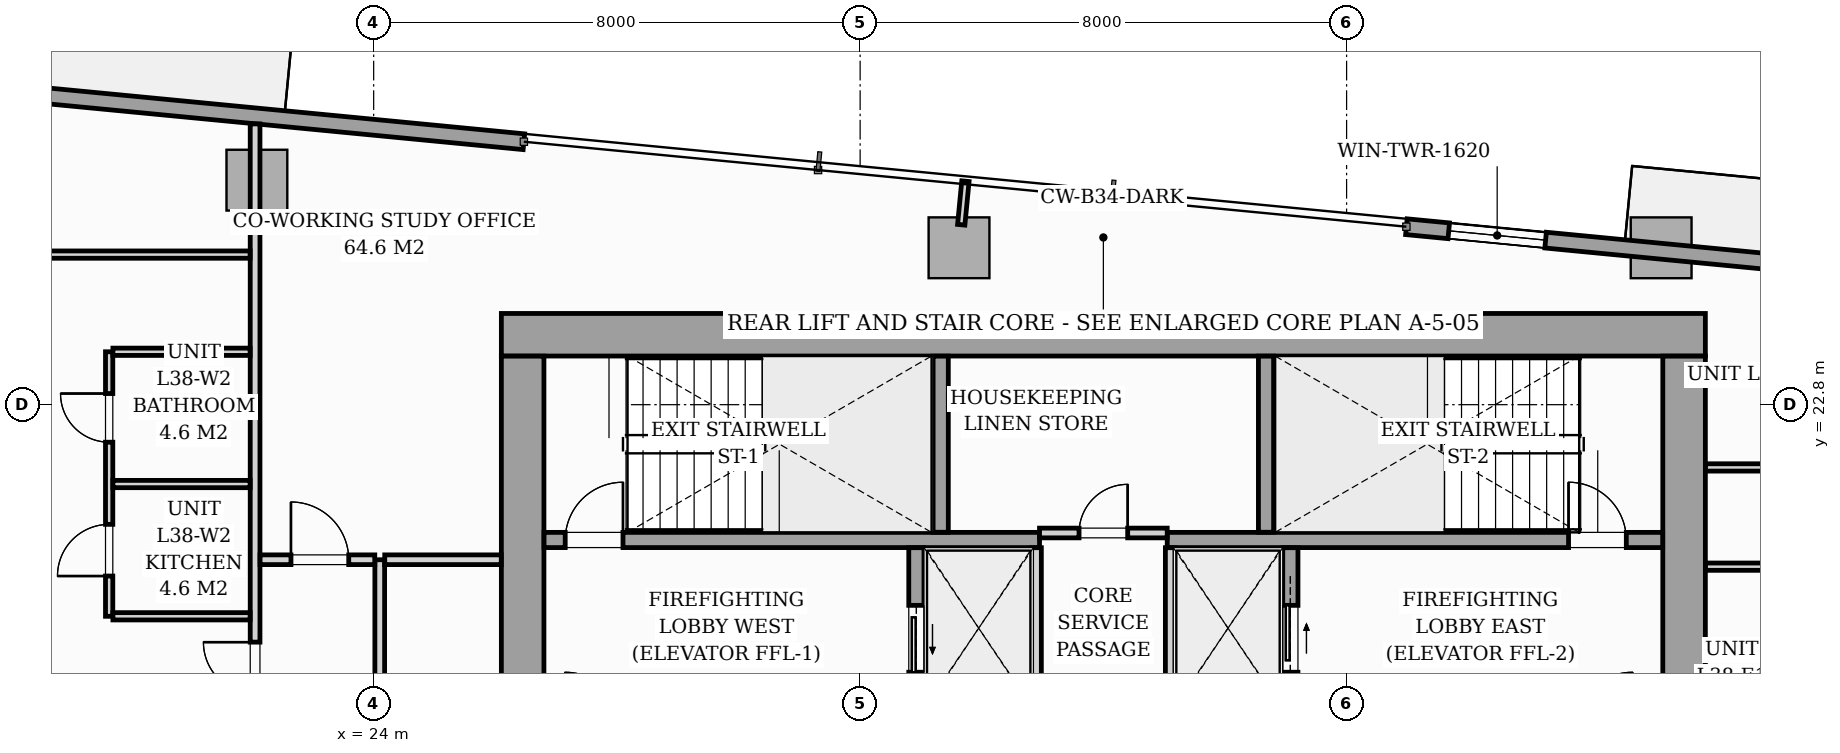
"""IFC4 building model, lengths in metres.
Left out: names, types, materials, properties, quantities, classifications, styles, units other than length and angle.
Written with IfcOpenShell. Run it as: python <this file> out.ifc"""

import sys

from ifc_helpers import new_model, si_unit, direction, frame, frame_2d, origin, origin_2d, place, context, subcontext, project, spatial, rectangle, i_section, extrude, source, transform, mapped, element, fill, save


model = new_model("IFC4")
c1 = context("Model", 3, precision=1e-05, world=origin(), true_north=direction((0.0, 1.0)))
c2 = subcontext(c1, "Body", "Model", "MODEL_VIEW")
j1 = project(units=[si_unit("LENGTHUNIT", "METRE"), si_unit("PLANEANGLEUNIT", "RADIAN")], contexts=[c1])
p1 = place(None, origin())
s1 = spatial("IfcSite", under=j1, at=p1, CompositionType="ELEMENT")
p2 = place(p1, origin())
s2 = spatial("IfcBuilding", under=s1, at=p2, CompositionType="ELEMENT")
p3 = place(p2, frame((0.0, 0.0, 134.2)))
s3 = spatial("IfcBuildingStorey", under=s2, at=p3, CompositionType="ELEMENT", Elevation=134.2)
m1 = source(origin(), c2, "Body", "SweptSolid", [
    extrude(i_section(OverallWidth=0.421, OverallDepth=0.465, WebThickness=0.045, FlangeThickness=0.073, FilletRadius=0.018, at=origin_2d()), origin(), (0.0, 0.0, 1.0), 3.196),
])
for number, where, z_axis, x_axis in (
    (1, (26.4, 24.0, 0.002), (0.0, 0.0, 1.0), (1.0, 0.0, 0.0)),
    (2, (33.12, 24.0, 0.002), (0.0, 0.0, 1.0), (1.0, 0.0, 0.0)),
    (3, (38.88, 24.0, 0.002), (0.0, 0.0, 1.0), (1.0, 0.0, 0.0)),
    (4, (45.6, 24.0, 0.002), (0.0, 0.0, 1.0), (1.0, 0.0, 0.0)),
):
    element("IfcColumn", number, at=place(p3, frame(where, z_axis=z_axis, x_axis=x_axis)), inside=s3, PredefinedType="PILASTER", context=c2, shape_type="MappedRepresentation", body=[
        mapped(m1, transform((0.0, 0.0, 0.0), scale=1.0)),
    ])
m2 = source(origin(), c2, "Body", "SweptSolid", [
    extrude(rectangle(XDim=1.0, YDim=1.0, at=origin_2d()), origin(), (0.0, 0.0, 1.0), 3.196),
])
for number, where, z_axis, x_axis in (
    (5, (22.08, 26.492, 0.002), (0.0, 0.0, 1.0), (0.995, -0.096, 0.0)),
    (6, (33.626, 25.38, 0.002), (0.0, 0.0, 1.0), (0.995, -0.096, 0.0)),
    (7, (45.173, 25.38, 0.002), (0.0, 0.0, 1.0), (0.995, -0.096, 0.0)),
):
    element("IfcColumn", number, at=place(p3, frame(where, z_axis=z_axis, x_axis=x_axis)), inside=s3, PredefinedType="COLUMN", context=c2, shape_type="MappedRepresentation", body=[
        mapped(m2, transform((0.0, 0.0, 0.0), scale=1.0)),
    ])
p4 = place(p3, frame((9.539, 28.754, 0.0), z_axis=(0.0, 0.0, 1.0), x_axis=(0.995397345886, -0.09583383433, 0.0)))
e8 = element("IfcWall", 8, at=p4, inside=s3, PredefinedType="STANDARD", context=c2, shape_type="SweptSolid", body=[
    extrude(rectangle(XDim=17.01, YDim=0.26, at=frame_2d((8.505, 0.0))), origin(), (0.0, 0.0, 1.0), 2.94),
])
p5 = place(p4, frame((6.424, 0.0, 0.0)))
e9 = element("IfcOpeningElement", 9, at=p5, cuts=e8, PredefinedType="OPENING", context=c2, shape_type="SweptSolid", body=[
    extrude(rectangle(XDim=1.8, YDim=2.06, at=frame_2d((0.9, 1.03))), frame((0.0, 0.14, 0.0), z_axis=(0.0, -1.0, 0.0), x_axis=(1.0, 0.0, 0.0)), (0.0, 0.0, 1.0), 0.28),
])
p6 = place(p4, frame((2.05, 0.0, 0.65)))
e10 = element("IfcOpeningElement", 10, at=p6, cuts=e8, PredefinedType="OPENING", context=c2, shape_type="SweptSolid", body=[
    extrude(rectangle(XDim=1.6, YDim=1.5, at=frame_2d((0.8, 0.75))), frame((0.0, 0.14, 0.0), z_axis=(0.0, -1.0, 0.0), x_axis=(1.0, 0.0, 0.0)), (0.0, 0.0, 1.0), 0.28),
])
p7 = place(p3, frame((40.983, 25.727, 0.0), z_axis=(0.0, 0.0, 1.0), x_axis=(0.995395844771, -0.095849424686, 0.0)))
e11 = element("IfcWall", 11, at=p7, inside=s3, PredefinedType="STANDARD", context=c2, shape_type="SweptSolid", body=[
    extrude(rectangle(XDim=17.01, YDim=0.26, at=frame_2d((8.505, 0.0))), origin(), (0.0, 0.0, 1.0), 2.94),
])
p8 = place(p7, frame((8.98, 0.0, 0.0)))
e12 = element("IfcOpeningElement", 12, at=p8, cuts=e11, PredefinedType="OPENING", context=c2, shape_type="SweptSolid", body=[
    extrude(rectangle(XDim=1.8, YDim=2.06, at=frame_2d((0.9, 1.03))), frame((0.0, 0.14, 0.0), z_axis=(0.0, -1.0, 0.0), x_axis=(1.0, 0.0, 0.0)), (0.0, 0.0, 1.0), 0.28),
])
p9 = place(p7, frame((0.7, 0.0, 0.65)))
e13 = element("IfcOpeningElement", 13, at=p9, cuts=e11, PredefinedType="OPENING", context=c2, shape_type="SweptSolid", body=[
    extrude(rectangle(XDim=1.6, YDim=1.5, at=frame_2d((0.8, 0.75))), frame((0.0, 0.14, 0.0), z_axis=(0.0, -1.0, 0.0), x_axis=(1.0, 0.0, 0.0)), (0.0, 0.0, 1.0), 0.28),
])
p10 = place(p3, frame((26.1, 23.95, 0.0), z_axis=(0.0, 0.0, 1.0), x_axis=(1.0, 0.0, 0.0)))
e14 = element("IfcWall", 14, at=p10, inside=s3, PredefinedType="SHEAR", context=c2, shape_type="SweptSolid", body=[
    extrude(rectangle(XDim=19.8, YDim=0.7, at=frame_2d((9.9, 0.0))), origin(), (0.0, 0.0, 1.0), 3.2),
])
for number, where, z_axis, x_axis in (
    (15, (26.45, 17.802, 0.0), (0.0, 0.0, 1.0), (0.0, 1.0, 0.0)),
    (16, (45.55, 17.802, 0.0), (0.0, 0.0, 1.0), (0.0, 1.0, 0.0)),
):
    element("IfcWall", number, at=place(p3, frame(where, z_axis=z_axis, x_axis=x_axis)), inside=s3, PredefinedType="SHEAR", context=c2, shape_type="SweptSolid", body=[
        extrude(rectangle(XDim=5.796, YDim=0.7, at=frame_2d((2.898, 0.0))), origin(), (0.0, 0.0, 1.0), 3.2),
    ])
p11 = place(p3, frame((26.802, 20.575, 0.0), z_axis=(0.0, 0.0, 1.0), x_axis=(1.0, 0.0, 0.0)))
e17 = element("IfcWall", 17, at=p11, inside=s3, PredefinedType="SOLIDWALL", context=c2, shape_type="SweptSolid", body=[
    extrude(rectangle(XDim=8.148, YDim=0.25, at=frame_2d((4.074, 0.0))), origin(), (0.0, 0.0, 1.0), 3.2),
])
p12 = place(p11, frame((0.348, 0.0, 0.0)))
e18 = element("IfcOpeningElement", 18, at=p12, cuts=e17, PredefinedType="OPENING", context=c2, shape_type="SweptSolid", body=[
    extrude(rectangle(XDim=0.95, YDim=2.06, at=frame_2d((0.475, 1.03))), frame((0.0, 0.135, 0.0), z_axis=(0.0, -1.0, 0.0), x_axis=(1.0, 0.0, 0.0)), (0.0, 0.0, 1.0), 0.27),
])
p13 = place(p3, frame((37.05, 20.575, 0.0), z_axis=(0.0, 0.0, 1.0), x_axis=(1.0, 0.0, 0.0)))
e19 = element("IfcWall", 19, at=p13, inside=s3, PredefinedType="SOLIDWALL", context=c2, shape_type="SweptSolid", body=[
    extrude(rectangle(XDim=8.148, YDim=0.25, at=frame_2d((4.074, 0.0))), origin(), (0.0, 0.0, 1.0), 3.2),
])
p14 = place(p13, frame((6.6, 0.0, 0.0)))
e20 = element("IfcOpeningElement", 20, at=p14, cuts=e19, PredefinedType="OPENING", context=c2, shape_type="SweptSolid", body=[
    extrude(rectangle(XDim=0.95, YDim=2.06, at=frame_2d((0.475, 1.03))), frame((0.0, 0.135, 0.0), z_axis=(0.0, -1.0, 0.0), x_axis=(1.0, 0.0, 0.0)), (0.0, 0.0, 1.0), 0.27),
])
for number, where, z_axis, x_axis in (
    (21, (33.325, 20.702, 0.0), (0.0, 0.0, 1.0), (0.0, 1.0, 0.0)),
    (22, (38.675, 20.702, 0.0), (0.0, 0.0, 1.0), (0.0, 1.0, 0.0)),
):
    element("IfcWall", number, at=place(p3, frame(where, z_axis=z_axis, x_axis=x_axis)), inside=s3, PredefinedType="SOLIDWALL", context=c2, shape_type="SweptSolid", body=[
        extrude(rectangle(XDim=2.896, YDim=0.25, at=frame_2d((1.448, 0.0))), origin(), (0.0, 0.0, 1.0), 3.2),
    ])
p15 = place(p3, frame((32.925, 17.802, 0.0), z_axis=(0.0, 0.0, 1.0), x_axis=(0.0, 1.0, 0.0)))
e23 = element("IfcWall", 23, at=p15, inside=s3, PredefinedType="SOLIDWALL", context=c2, shape_type="SweptSolid", body=[
    extrude(rectangle(XDim=2.646, YDim=0.25, at=frame_2d((1.323, 0.0))), origin(), (0.0, 0.0, 1.0), 3.2),
])
p16 = place(p15, frame((0.598, 0.0, 0.0)))
e24 = element("IfcOpeningElement", 24, at=p16, cuts=e23, PredefinedType="OPENING", context=c2, shape_type="SweptSolid", body=[
    extrude(rectangle(XDim=1.1, YDim=2.08, at=frame_2d((0.55, 1.04))), frame((0.0, 0.135, 0.0), z_axis=(0.0, -1.0, 0.0), x_axis=(1.0, 0.0, 0.0)), (0.0, 0.0, 1.0), 0.27),
])
for number, where, z_axis, x_axis in (
    (25, (34.9, 17.802, 0.0), (0.0, 0.0, 1.0), (0.0, 1.0, 0.0)),
    (26, (37.1, 17.802, 0.0), (0.0, 0.0, 1.0), (0.0, 1.0, 0.0)),
):
    element("IfcWall", number, at=place(p3, frame(where, z_axis=z_axis, x_axis=x_axis)), inside=s3, PredefinedType="PARTITIONING", context=c2, shape_type="SweptSolid", body=[
        extrude(rectangle(XDim=2.646, YDim=0.16, at=frame_2d((1.323, 0.0))), origin(), (0.0, 0.0, 1.0), 2.94),
    ])
p17 = place(p3, frame((39.075, 17.802, 0.0), z_axis=(0.0, 0.0, 1.0), x_axis=(0.0, 1.0, 0.0)))
e27 = element("IfcWall", 27, at=p17, inside=s3, PredefinedType="SOLIDWALL", context=c2, shape_type="SweptSolid", body=[
    extrude(rectangle(XDim=2.646, YDim=0.25, at=frame_2d((1.323, 0.0))), origin(), (0.0, 0.0, 1.0), 3.2),
])
p18 = place(p17, frame((0.598, 0.0, 0.0)))
e28 = element("IfcOpeningElement", 28, at=p18, cuts=e27, PredefinedType="OPENING", context=c2, shape_type="SweptSolid", body=[
    extrude(rectangle(XDim=1.1, YDim=2.08, at=frame_2d((0.55, 1.04))), frame((0.0, 0.135, 0.0), z_axis=(0.0, -1.0, 0.0), x_axis=(1.0, 0.0, 0.0)), (0.0, 0.0, 1.0), 0.27),
])
p19 = place(p3, frame((34.95, 20.69, 0.0), z_axis=(0.0, 0.0, 1.0), x_axis=(1.0, 0.0, 0.0)))
e29 = element("IfcWall", 29, at=p19, inside=s3, PredefinedType="PARTITIONING", context=c2, shape_type="SweptSolid", body=[
    extrude(rectangle(XDim=2.1, YDim=0.16, at=frame_2d((1.05, 0.0))), origin(), (0.0, 0.0, 1.0), 2.94),
])
p20 = place(p19, frame((0.65, 0.0, 0.0)))
e30 = element("IfcOpeningElement", 30, at=p20, cuts=e29, PredefinedType="OPENING", context=c2, shape_type="SweptSolid", body=[
    extrude(rectangle(XDim=0.8, YDim=2.05, at=frame_2d((0.4, 1.025))), frame((0.0, 0.09, 0.0), z_axis=(0.0, -1.0, 0.0), x_axis=(1.0, 0.0, 0.0)), (0.0, 0.0, 1.0), 0.18),
])
p21 = place(p3, frame((22.05, 12.732, 0.0), z_axis=(0.0, 0.0, 1.0), x_axis=(0.0, 1.0, 0.0)))
e31 = element("IfcWall", 31, at=p21, inside=s3, PredefinedType="PARTITIONING", context=c2, shape_type="SweptSolid", body=[
    extrude(rectangle(XDim=14.685, YDim=0.16, at=frame_2d((7.343, 0.0))), origin(), (0.0, 0.0, 1.0), 2.94),
])
p22 = place(p21, frame((0.493, 0.0, 0.0)))
e32 = element("IfcOpeningElement", 32, at=p22, cuts=e31, PredefinedType="OPENING", context=c2, shape_type="SweptSolid", body=[
    extrude(rectangle(XDim=0.95, YDim=2.06, at=frame_2d((0.475, 1.03))), frame((0.0, 0.09, 0.0), z_axis=(0.0, -1.0, 0.0), x_axis=(1.0, 0.0, 0.0)), (0.0, 0.0, 1.0), 0.18),
])
p23 = place(p21, frame((5.313, 0.0, 0.0)))
e33 = element("IfcOpeningElement", 33, at=p23, cuts=e31, PredefinedType="OPENING", context=c2, shape_type="SweptSolid", body=[
    extrude(rectangle(XDim=0.85, YDim=2.0, at=frame_2d((0.425, 1.0))), frame((0.0, 0.09, 0.0), z_axis=(0.0, -1.0, 0.0), x_axis=(1.0, 0.0, 0.0)), (0.0, 0.0, 1.0), 0.18),
])
p24 = place(p3, frame((19.65, 19.32, 0.0), z_axis=(0.0, 0.0, 1.0), x_axis=(0.0, 1.0, 0.0)))
e34 = element("IfcWall", 34, at=p24, inside=s3, PredefinedType="PARTITIONING", context=c2, shape_type="SweptSolid", body=[
    extrude(rectangle(XDim=4.35, YDim=0.12, at=frame_2d((2.175, 0.0))), origin(), (0.0, 0.0, 1.0), 2.94),
])
p25 = place(p24, frame((0.662, 0.0, 0.0)))
e35 = element("IfcOpeningElement", 35, at=p25, cuts=e34, PredefinedType="OPENING", context=c2, shape_type="SweptSolid", body=[
    extrude(rectangle(XDim=0.85, YDim=2.05, at=frame_2d((0.425, 1.025))), frame((0.0, 0.07, 0.0), z_axis=(0.0, -1.0, 0.0), x_axis=(1.0, 0.0, 0.0)), (0.0, 0.0, 1.0), 0.14),
])
p26 = place(p24, frame((2.863, 0.0, 0.0)))
e36 = element("IfcOpeningElement", 36, at=p26, cuts=e34, PredefinedType="OPENING", context=c2, shape_type="SweptSolid", body=[
    extrude(rectangle(XDim=0.8, YDim=2.02, at=frame_2d((0.4, 1.01))), frame((0.0, 0.07, 0.0), z_axis=(0.0, -1.0, 0.0), x_axis=(1.0, 0.0, 0.0)), (0.0, 0.0, 1.0), 0.14),
])
for number, where, z_axis, x_axis in (
    (37, (19.712, 21.495, 0.0), (0.0, 0.0, 1.0), (1.0, 0.0, 0.0)),
    (38, (19.712, 19.32, 0.0), (0.0, 0.0, 1.0), (1.0, 0.0, 0.0)),
    (39, (19.712, 23.67, 0.0), (0.0, 0.0, 1.0), (1.0, 0.0, 0.0)),
):
    element("IfcWall", number, at=place(p3, frame(where, z_axis=z_axis, x_axis=x_axis)), inside=s3, PredefinedType="PARTITIONING", context=c2, shape_type="SweptSolid", body=[
        extrude(rectangle(XDim=2.256, YDim=0.12, at=frame_2d((1.128, 0.0))), origin(), (0.0, 0.0, 1.0), 2.94),
    ])
p27 = place(p3, frame((14.426, 25.268, 0.0), z_axis=(0.0, 0.0, 1.0), x_axis=(1.0, 0.0, 0.0)))
e40 = element("IfcWall", 40, at=p27, inside=s3, PredefinedType="PARTITIONING", context=c2, shape_type="SweptSolid", body=[
    extrude(rectangle(XDim=7.542, YDim=0.12, at=frame_2d((3.771, 0.0))), origin(), (0.0, 0.0, 1.0), 2.94),
])
p28 = place(p27, frame((3.316, 0.0, 0.0)))
e41 = element("IfcOpeningElement", 41, at=p28, cuts=e40, PredefinedType="OPENING", context=c2, shape_type="SweptSolid", body=[
    extrude(rectangle(XDim=0.85, YDim=2.05, at=frame_2d((0.425, 1.025))), frame((0.0, 0.07, 0.0), z_axis=(0.0, -1.0, 0.0), x_axis=(1.0, 0.0, 0.0)), (0.0, 0.0, 1.0), 0.14),
])
p29 = place(p3, frame((45.902, 18.85, 0.0), z_axis=(0.0, 0.0, 1.0), x_axis=(1.0, 0.0, 0.0)))
e42 = element("IfcWall", 42, at=p29, inside=s3, PredefinedType="PARTITIONING", context=c2, shape_type="SweptSolid", body=[
    extrude(rectangle(XDim=2.316, YDim=0.12, at=frame_2d((1.158, 0.0))), origin(), (0.0, 0.0, 1.0), 2.94),
])
p30 = place(p3, frame((45.902, 21.768, 0.0), z_axis=(0.0, 0.0, 1.0), x_axis=(1.0, 0.0, 0.0)))
e43 = element("IfcWall", 43, at=p30, inside=s3, PredefinedType="PARTITIONING", context=c2, shape_type="SweptSolid", body=[
    extrude(rectangle(XDim=12.781, YDim=0.12, at=frame_2d((6.391, 0.0))), origin(), (0.0, 0.0, 1.0), 2.94),
])
p31 = place(p30, frame((6.146, 0.0, 0.0)))
e44 = element("IfcOpeningElement", 44, at=p31, cuts=e43, PredefinedType="OPENING", context=c2, shape_type="SweptSolid", body=[
    extrude(rectangle(XDim=0.85, YDim=2.05, at=frame_2d((0.425, 1.025))), frame((0.0, 0.07, 0.0), z_axis=(0.0, -1.0, 0.0), x_axis=(1.0, 0.0, 0.0)), (0.0, 0.0, 1.0), 0.14),
])
p32 = place(p3, frame((45.902, 20.136, 0.0), z_axis=(0.0, 0.0, 1.0), x_axis=(1.0, 0.0, 0.0)))
e45 = element("IfcWall", 45, at=p32, inside=s3, PredefinedType="PARTITIONING", context=c2, shape_type="SweptSolid", body=[
    extrude(rectangle(XDim=14.063, YDim=0.12, at=frame_2d((7.031, 0.0))), origin(), (0.0, 0.0, 1.0), 2.94),
])
p33 = place(p32, frame((6.708, 0.0, 0.0)))
e46 = element("IfcOpeningElement", 46, at=p33, cuts=e45, PredefinedType="OPENING", context=c2, shape_type="SweptSolid", body=[
    extrude(rectangle(XDim=0.85, YDim=2.05, at=frame_2d((0.425, 1.025))), frame((0.0, 0.07, 0.0), z_axis=(0.0, -1.0, 0.0), x_axis=(1.0, 0.0, 0.0)), (0.0, 0.0, 1.0), 0.14),
])
p34 = place(p3, frame((24.1, 14.66, 0.0), z_axis=(0.0, 0.0, 1.0), x_axis=(0.0, 1.0, 0.0)))
e47 = element("IfcWall", 47, at=p34, inside=s3, PredefinedType="PARTITIONING", context=c2, shape_type="SweptSolid", body=[
    extrude(rectangle(XDim=5.59, YDim=0.16, at=frame_2d((2.795, 0.0))), origin(), (0.0, 0.0, 1.0), 2.94),
])
p35 = place(p34, frame((2.36, 0.0, 0.0)))
e48 = element("IfcOpeningElement", 48, at=p35, cuts=e47, PredefinedType="OPENING", context=c2, shape_type="SweptSolid", body=[
    extrude(rectangle(XDim=0.85, YDim=2.0, at=frame_2d((0.425, 1.0))), frame((0.0, 0.09, 0.0), z_axis=(0.0, -1.0, 0.0), x_axis=(1.0, 0.0, 0.0)), (0.0, 0.0, 1.0), 0.18),
])
p36 = place(p3, frame((22.132, 20.25, 0.0), z_axis=(0.0, 0.0, 1.0), x_axis=(1.0, 0.0, 0.0)))
e49 = element("IfcWall", 49, at=p36, inside=s3, PredefinedType="PARTITIONING", context=c2, shape_type="SweptSolid", body=[
    extrude(rectangle(XDim=1.886, YDim=0.16, at=frame_2d((0.943, 0.0))), origin(), (0.0, 0.0, 1.0), 2.94),
])
p37 = place(p36, frame((0.508, 0.0, 0.0)))
e50 = element("IfcOpeningElement", 50, at=p37, cuts=e49, PredefinedType="OPENING", context=c2, shape_type="SweptSolid", body=[
    extrude(rectangle(XDim=0.95, YDim=2.06, at=frame_2d((0.475, 1.03))), frame((0.0, 0.09, 0.0), z_axis=(0.0, -1.0, 0.0), x_axis=(1.0, 0.0, 0.0)), (0.0, 0.0, 1.0), 0.18),
])
p38 = place(p3, frame((24.182, 20.25, 0.0), z_axis=(0.0, 0.0, 1.0), x_axis=(1.0, 0.0, 0.0)))
e51 = element("IfcWall", 51, at=p38, inside=s3, PredefinedType="PARTITIONING", context=c2, shape_type="SweptSolid", body=[
    extrude(rectangle(XDim=1.916, YDim=0.16, at=frame_2d((0.958, 0.0))), origin(), (0.0, 0.0, 1.0), 2.94),
])
p39 = place(p3, frame((33.663, 25.759, 0.0), z_axis=(0.0, 0.0, 1.0), x_axis=(0.095977354523, 0.995383517755, 0.0)))
e52 = element("IfcWall", 52, at=p39, inside=s3, PredefinedType="PARTITIONING", context=c2, shape_type="SweptSolid", body=[
    extrude(rectangle(XDim=0.72, YDim=0.12, at=frame_2d((0.36, 0.0))), origin(), (0.0, 0.0, 1.0), 2.94),
])
m3 = source(origin(), c2, "Body", "SweptSolid", [
    extrude(rectangle(XDim=1.6, YDim=1.5, at=frame_2d((0.8, 0.75))), frame((0.0, 0.03, 0.0), z_axis=(0.0, -1.0, 0.0), x_axis=(1.0, 0.0, 0.0)), (0.0, 0.0, 1.0), 0.06),
])
p40 = place(p9, origin())
e53 = element("IfcWindow", 53, at=p40, inside=s3, PartitioningType="SINGLE_PANEL", PredefinedType="WINDOW", context=c2, shape_type="MappedRepresentation", body=[
    mapped(m3, transform((0.0, 0.0, 0.0), scale=1.0)),
])
fill(e13, e53)
m4 = source(origin(), c2, "Body", "SweptSolid", [
    extrude(rectangle(XDim=0.95, YDim=2.06, at=frame_2d((0.475, 1.03))), frame((0.0, 0.025, 0.0), z_axis=(0.0, -1.0, 0.0), x_axis=(1.0, 0.0, 0.0)), (0.0, 0.0, 1.0), 0.05),
])
p41 = place(p12, origin())
e54 = element("IfcDoor", 54, at=p41, inside=s3, OperationType="SINGLE_SWING_RIGHT", PredefinedType="DOOR", context=c2, shape_type="MappedRepresentation", body=[
    mapped(m4, transform((0.0, 0.0, 0.0), scale=1.0)),
])
fill(e18, e54)
p42 = place(p14, origin())
e55 = element("IfcDoor", 55, at=p42, inside=s3, OperationType="SINGLE_SWING_LEFT", PredefinedType="DOOR", context=c2, shape_type="MappedRepresentation", body=[
    mapped(m4, transform((0.0, 0.0, 0.0), scale=1.0)),
])
fill(e20, e55)
m5 = source(origin(), c2, "Body", "SweptSolid", [
    extrude(rectangle(XDim=1.1, YDim=2.08, at=frame_2d((0.55, 1.04))), frame((0.0, 0.025, 0.0), z_axis=(0.0, -1.0, 0.0), x_axis=(1.0, 0.0, 0.0)), (0.0, 0.0, 1.0), 0.05),
])
p43 = place(p16, origin())
e56 = element("IfcDoor", 56, at=p43, inside=s3, OperationType="SLIDING_TO_LEFT", PredefinedType="DOOR", context=c2, shape_type="MappedRepresentation", body=[
    mapped(m5, transform((0.0, 0.0, 0.0), scale=1.0)),
])
fill(e24, e56)
p44 = place(p18, origin())
e57 = element("IfcDoor", 57, at=p44, inside=s3, OperationType="SLIDING_TO_RIGHT", PredefinedType="DOOR", context=c2, shape_type="MappedRepresentation", body=[
    mapped(m5, transform((0.0, 0.0, 0.0), scale=1.0)),
])
fill(e28, e57)
m6 = source(origin(), c2, "Body", "SweptSolid", [
    extrude(rectangle(XDim=0.8, YDim=2.05, at=frame_2d((0.4, 1.025))), frame((0.0, 0.025, 0.0), z_axis=(0.0, -1.0, 0.0), x_axis=(1.0, 0.0, 0.0)), (0.0, 0.0, 1.0), 0.05),
])
p45 = place(p20, origin())
e58 = element("IfcDoor", 58, at=p45, inside=s3, OperationType="SINGLE_SWING_RIGHT", PredefinedType="DOOR", context=c2, shape_type="MappedRepresentation", body=[
    mapped(m6, transform((0.0, 0.0, 0.0), scale=1.0)),
])
fill(e30, e58)
m7 = source(origin(), c2, "Body", "SweptSolid", [
    extrude(rectangle(XDim=0.85, YDim=2.0, at=frame_2d((0.425, 1.0))), frame((0.0, 0.025, 0.0), z_axis=(0.0, -1.0, 0.0), x_axis=(1.0, 0.0, 0.0)), (0.0, 0.0, 1.0), 0.05),
])
p46 = place(p23, origin())
e59 = element("IfcDoor", 59, at=p46, inside=s3, OperationType="SINGLE_SWING_RIGHT", PredefinedType="DOOR", context=c2, shape_type="MappedRepresentation", body=[
    mapped(m7, transform((0.0, 0.0, 0.0), scale=1.0)),
])
fill(e33, e59)
m8 = source(origin(), c2, "Body", "SweptSolid", [
    extrude(rectangle(XDim=0.85, YDim=2.05, at=frame_2d((0.425, 1.025))), frame((0.0, 0.025, 0.0), z_axis=(0.0, -1.0, 0.0), x_axis=(1.0, 0.0, 0.0)), (0.0, 0.0, 1.0), 0.05),
])
p47 = place(p25, origin())
e60 = element("IfcDoor", 60, at=p47, inside=s3, OperationType="SINGLE_SWING_LEFT", PredefinedType="DOOR", context=c2, shape_type="MappedRepresentation", body=[
    mapped(m8, transform((0.0, 0.0, 0.0), scale=1.0)),
])
fill(e35, e60)
m9 = source(origin(), c2, "Body", "SweptSolid", [
    extrude(rectangle(XDim=0.8, YDim=2.02, at=frame_2d((0.4, 1.01))), frame((0.0, 0.025, 0.0), z_axis=(0.0, -1.0, 0.0), x_axis=(1.0, 0.0, 0.0)), (0.0, 0.0, 1.0), 0.05),
])
p48 = place(p26, origin())
e61 = element("IfcDoor", 61, at=p48, inside=s3, OperationType="SINGLE_SWING_RIGHT", PredefinedType="DOOR", context=c2, shape_type="MappedRepresentation", body=[
    mapped(m9, transform((0.0, 0.0, 0.0), scale=1.0)),
])
fill(e36, e61)
m10 = source(origin(), c2, "Body", "SweptSolid", [
    extrude(rectangle(XDim=0.95, YDim=2.06, at=frame_2d((0.475, 1.03))), frame((0.0, 0.025, 0.0), z_axis=(0.0, -1.0, 0.0), x_axis=(1.0, 0.0, 0.0)), (0.0, 0.0, 1.0), 0.05),
])
p49 = place(p37, origin())
e62 = element("IfcDoor", 62, at=p49, inside=s3, OperationType="SINGLE_SWING_LEFT", PredefinedType="DOOR", context=c2, shape_type="MappedRepresentation", body=[
    mapped(m10, transform((0.0, 0.0, 0.0), scale=1.0)),
])
fill(e50, e62)
save(model, sys.argv[1])
